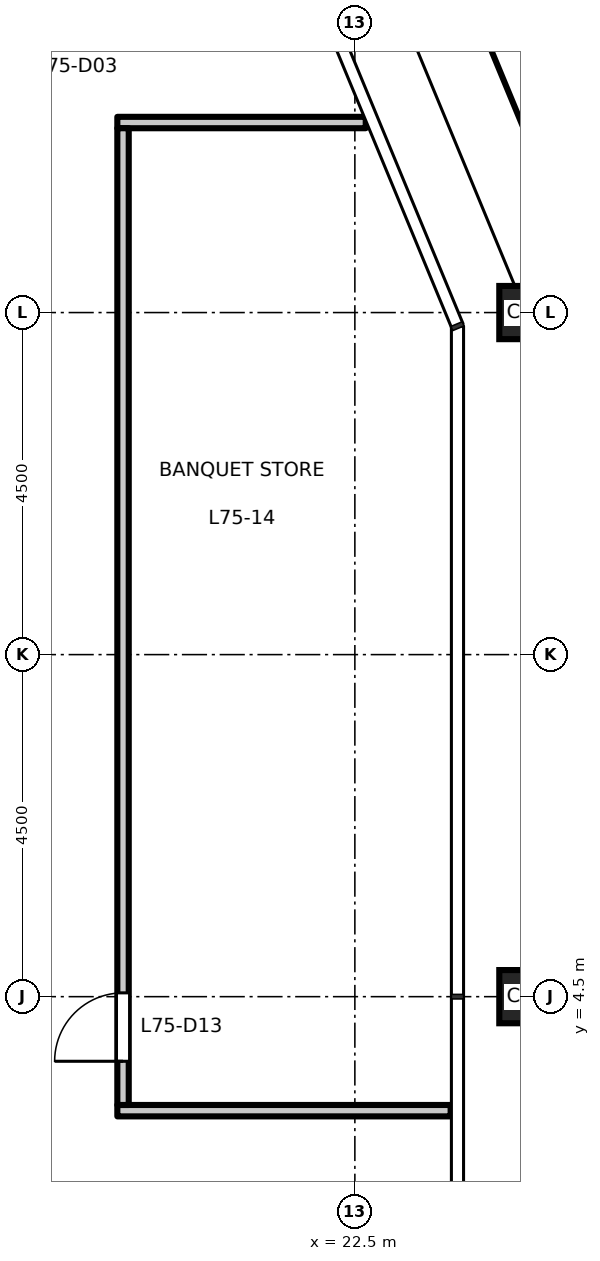
"""IFC4 building model, lengths in metres.
Left out: names, types, materials, properties, quantities, classifications, styles, units other than length and angle.
Written with IfcOpenShell. Run it as: python <this file> out.ifc"""

import sys

from ifc_helpers import new_model, si_unit, direction, frame, frame_2d, origin, origin_2d, place, context, subcontext, project, spatial, rectangle, hollow_rectangle, extrude, element, fill, save


model = new_model("IFC4")
c1 = context("Model", 3, precision=1e-05, world=origin(), true_north=direction((0.0, 1.0)))
c2 = subcontext(c1, "Body", "Model", "MODEL_VIEW")
j1 = project(units=[si_unit("LENGTHUNIT", "METRE"), si_unit("PLANEANGLEUNIT", "RADIAN")], contexts=[c1])
p1 = place(None, origin())
s1 = spatial("IfcSite", under=j1, at=p1, CompositionType="ELEMENT")
p2 = place(p1, origin())
s2 = spatial("IfcBuilding", under=s1, at=p2, CompositionType="ELEMENT")
p3 = place(p2, frame((0.0, 0.0, 348.2)))
s3 = spatial("IfcBuildingStorey", under=s2, at=p3, CompositionType="ELEMENT", Elevation=348.2)
for number, where, z_axis, x_axis in (
    (1, (24.75, 4.5, 0.0), (0.0, 0.0, 1.0), (1.0, 0.0, 0.0)),
    (2, (24.75, 13.5, 0.0), (0.0, 0.0, 1.0), (1.0, 0.0, 0.0)),
):
    element("IfcColumn", number, at=place(p3, frame(where, z_axis=z_axis, x_axis=x_axis)), inside=s3, PredefinedType="COLUMN", context=c2, shape_type="SweptSolid", body=[
        extrude(hollow_rectangle(XDim=0.7, YDim=0.7, WallThickness=0.036, at=origin_2d()), origin(), (0.0, 0.0, 1.0), 5.0),
    ])
p4 = place(p3, frame((19.375, 3.0, 0.0), z_axis=(0.0, 0.0, 1.0), x_axis=(1.0, 0.0, 0.0)))
e3 = element("IfcWall", 3, at=p4, inside=s3, PredefinedType="PARTITIONING", context=c2, shape_type="SweptSolid", body=[
    extrude(rectangle(XDim=4.385, YDim=0.15, at=frame_2d((2.192, 0.0))), origin(), (0.0, 0.0, 1.0), 4.8),
])
p5 = place(p3, frame((19.375, 16.0, 0.0), z_axis=(0.0, 0.0, 1.0), x_axis=(1.0, 0.0, 0.0)))
e4 = element("IfcWall", 4, at=p5, inside=s3, PredefinedType="PARTITIONING", context=c2, shape_type="SweptSolid", body=[
    extrude(rectangle(XDim=3.268, YDim=0.15, at=frame_2d((1.634, 0.0))), origin(), (0.0, 0.0, 1.0), 4.8),
])
p6 = place(p3, frame((19.45, 3.075, 0.0), z_axis=(0.0, 0.0, 1.0), x_axis=(0.0, 1.0, 0.0)))
e5 = element("IfcWall", 5, at=p6, inside=s3, PredefinedType="PARTITIONING", context=c2, shape_type="SweptSolid", body=[
    extrude(rectangle(XDim=12.85, YDim=0.15, at=frame_2d((6.425, 0.0))), origin(), (0.0, 0.0, 1.0), 4.8),
])
p7 = place(p6, frame((0.575, 0.0, 0.0)))
e6 = element("IfcOpeningElement", 6, at=p7, cuts=e5, PredefinedType="OPENING", context=c2, shape_type="SweptSolid", body=[
    extrude(rectangle(XDim=0.9, YDim=2.1, at=frame_2d((0.45, 1.05))), frame((0.0, 0.085, 0.0), z_axis=(0.0, -1.0, 0.0), x_axis=(1.0, 0.0, 0.0)), (0.0, 0.0, 1.0), 0.17),
])
p8 = place(p7, origin())
e7 = element("IfcDoor", 7, at=p8, inside=s3, OperationType="SINGLE_SWING_LEFT", PredefinedType="DOOR", context=c2, shape_type="SweptSolid", body=[
    extrude(rectangle(XDim=0.9, YDim=2.1, at=frame_2d((0.45, 1.05))), frame((0.0, 0.025, 0.0), z_axis=(0.0, -1.0, 0.0), x_axis=(1.0, 0.0, 0.0)), (0.0, 0.0, 1.0), 0.05),
])
fill(e6, e7)
save(model, sys.argv[1])
